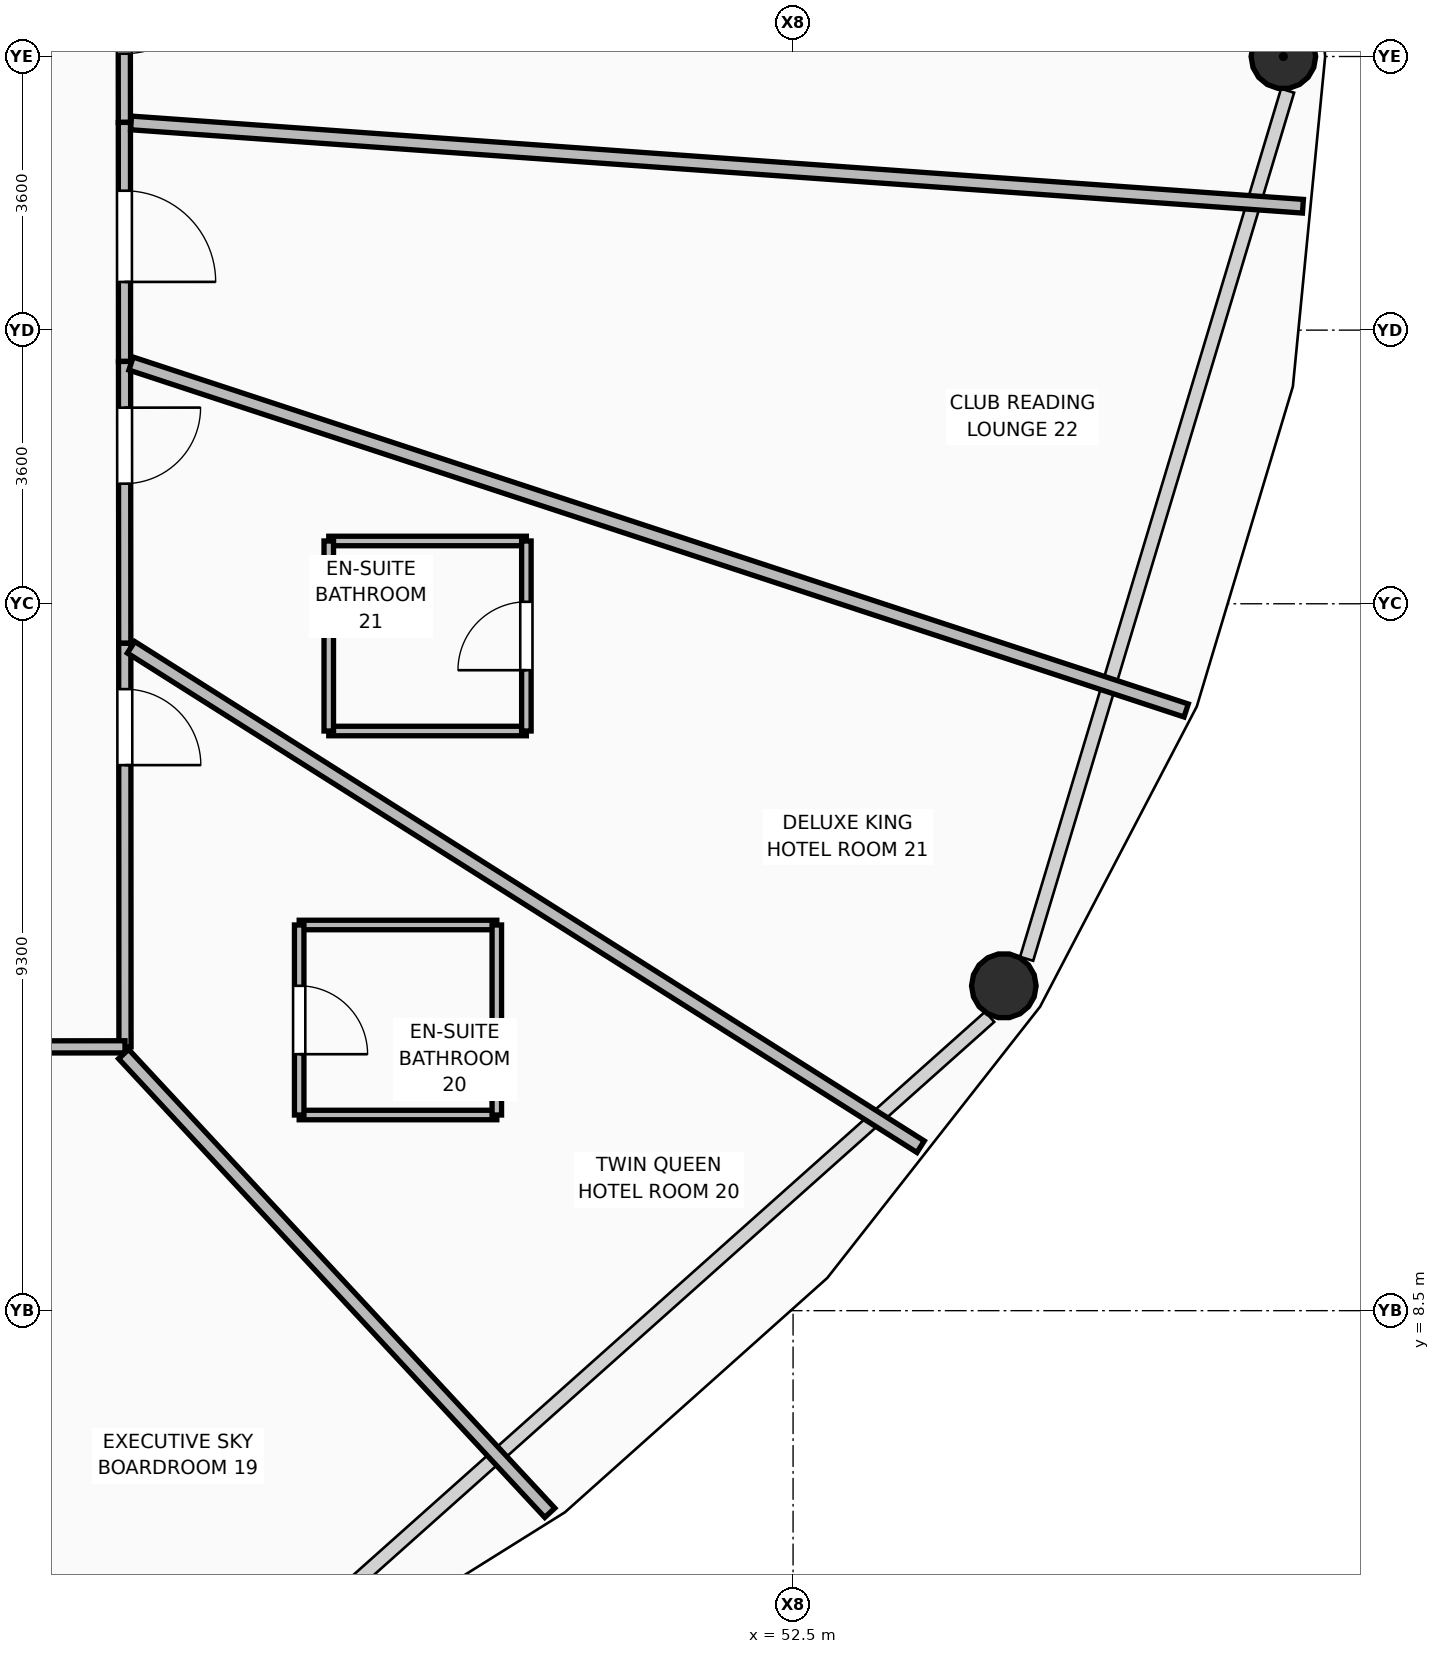
"""IFC4 building model, lengths in metres.
Left out: names, types, materials, properties, quantities, classifications, styles, units other than length and angle.
Written with IfcOpenShell. Run it as: python <this file> out.ifc"""

import sys

from ifc_helpers import new_model, si_unit, direction, frame, frame_2d, origin, origin_2d, place, context, subcontext, project, spatial, rectangle, hollow_circle, extrude, element, fill, save


model = new_model("IFC4")
c1 = context("Model", 3, precision=1e-05, world=origin(), true_north=direction((0.0, 1.0)))
c2 = subcontext(c1, "Body", "Model", "MODEL_VIEW")
j1 = project(units=[si_unit("LENGTHUNIT", "METRE"), si_unit("PLANEANGLEUNIT", "RADIAN")], contexts=[c1])
p1 = place(None, origin())
s1 = spatial("IfcSite", under=j1, at=p1, CompositionType="ELEMENT")
p2 = place(p1, origin())
s2 = spatial("IfcBuilding", under=s1, at=p2, CompositionType="ELEMENT")
p3 = place(p2, frame((0.0, 0.0, 64.5)))
s3 = spatial("IfcBuildingStorey", under=s2, at=p3, CompositionType="ELEMENT", Elevation=64.5)
p4 = place(p3, frame((58.951, 25.0, 0.0), z_axis=(0.055647755416, 0.0, 0.998450463126), x_axis=(0.0, 1.0, 0.0)))
e1 = element("IfcColumn", 1, at=p4, inside=s3, PredefinedType="COLUMN", context=c2, shape_type="SweptSolid", body=[
    extrude(hollow_circle(Radius=0.425, WallThickness=0.04, at=origin_2d()), origin(), (0.0, 0.0, 1.0), 3.576),
])
p5 = place(p3, frame((55.273, 12.774, 0.0), z_axis=(0.048413411524, -0.024855404506, 0.998518077178), x_axis=(0.456724176891, 0.889608355538, 0.0)))
e2 = element("IfcColumn", 2, at=p5, inside=s3, PredefinedType="COLUMN", context=c2, shape_type="SweptSolid", body=[
    extrude(hollow_circle(Radius=0.425, WallThickness=0.04, at=origin_2d()), origin(), (0.0, 0.0, 1.0), 3.575),
])
p6 = place(p3, frame((43.699, 27.142, 0.0), z_axis=(0.0, 0.0, 1.0), x_axis=(0.00097363037, -0.999999526022, 0.0)))
e3 = element("IfcWall", 3, at=p6, inside=s3, PredefinedType="PARTITIONING", context=c2, shape_type="SweptSolid", body=[
    extrude(rectangle(XDim=3.009, YDim=0.16, at=frame_2d((1.504, 0.0))), origin(), (0.0, 0.0, 1.0), 3.55),
])
p7 = place(p6, frame((0.905, 0.0, 0.0)))
e4 = element("IfcOpeningElement", 4, at=p7, cuts=e3, PredefinedType="OPENING", context=c2, shape_type="SweptSolid", body=[
    extrude(rectangle(XDim=1.2, YDim=2.1, at=frame_2d((0.6, 1.05))), frame((0.0, 0.09, 0.0), z_axis=(0.0, -1.0, 0.0), x_axis=(1.0, 0.0, 0.0)), (0.0, 0.0, 1.0), 0.18),
])
p8 = place(p3, frame((43.702, 24.133, 0.0), z_axis=(0.0, 0.0, 1.0), x_axis=(0.000698649108, -0.999999755945, 0.0)))
e5 = element("IfcWall", 5, at=p8, inside=s3, PredefinedType="PARTITIONING", context=c2, shape_type="SweptSolid", body=[
    extrude(rectangle(XDim=3.145, YDim=0.16, at=frame_2d((1.573, 0.0))), origin(), (0.0, 0.0, 1.0), 2.928),
])
p9 = place(p8, frame((0.899, 0.0, 0.0)))
e6 = element("IfcOpeningElement", 6, at=p9, cuts=e5, PredefinedType="OPENING", context=c2, shape_type="SweptSolid", body=[
    extrude(rectangle(XDim=1.2, YDim=2.1, at=frame_2d((0.6, 1.05))), frame((0.0, 0.09, 0.0), z_axis=(0.0, -1.0, 0.0), x_axis=(1.0, 0.0, 0.0)), (0.0, 0.0, 1.0), 0.18),
])
p10 = place(p3, frame((43.704, 20.988, 0.0), z_axis=(0.0, 0.0, 1.0), x_axis=(0.000790097199, -0.999999687873, 0.0)))
e7 = element("IfcWall", 7, at=p10, inside=s3, PredefinedType="PARTITIONING", context=c2, shape_type="SweptSolid", body=[
    extrude(rectangle(XDim=3.708, YDim=0.16, at=frame_2d((1.854, 0.0))), origin(), (0.0, 0.0, 1.0), 2.928),
])
p11 = place(p10, frame((0.608, 0.0, 0.0)))
e8 = element("IfcOpeningElement", 8, at=p11, cuts=e7, PredefinedType="OPENING", context=c2, shape_type="SweptSolid", body=[
    extrude(rectangle(XDim=1.0, YDim=2.1, at=frame_2d((0.5, 1.05))), frame((0.0, 0.09, 0.0), z_axis=(0.0, -1.0, 0.0), x_axis=(1.0, 0.0, 0.0)), (0.0, 0.0, 1.0), 0.18),
])
p12 = place(p3, frame((43.707, 17.28, 0.0), z_axis=(0.0, 0.0, 1.0), x_axis=(0.000551825539, -0.999999847744, 0.0)))
e9 = element("IfcWall", 9, at=p12, inside=s3, PredefinedType="PARTITIONING", context=c2, shape_type="SweptSolid", body=[
    extrude(rectangle(XDim=5.309, YDim=0.16, at=frame_2d((2.655, 0.0))), origin(), (0.0, 0.0, 1.0), 2.928),
])
p13 = place(p12, frame((0.603, 0.0, 0.0)))
e10 = element("IfcOpeningElement", 10, at=p13, cuts=e9, PredefinedType="OPENING", context=c2, shape_type="SweptSolid", body=[
    extrude(rectangle(XDim=1.0, YDim=2.1, at=frame_2d((0.5, 1.05))), frame((0.0, 0.09, 0.0), z_axis=(0.0, -1.0, 0.0), x_axis=(1.0, 0.0, 0.0)), (0.0, 0.0, 1.0), 0.18),
])
p14 = place(p3, frame((43.71, 11.971, 0.0), z_axis=(0.0, 0.0, 1.0), x_axis=(-0.999999746124, -0.000712567736, 0.0)))
e11 = element("IfcWall", 11, at=p14, inside=s3, PredefinedType="PARTITIONING", context=c2, shape_type="SweptSolid", body=[
    extrude(rectangle(XDim=5.482, YDim=0.16, at=frame_2d((2.741, 0.0))), origin(), (0.0, 0.0, 1.0), 2.928),
])
p15 = place(p14, frame((2.655, 0.0, 0.0)))
e12 = element("IfcOpeningElement", 12, at=p15, cuts=e11, PredefinedType="OPENING", context=c2, shape_type="SweptSolid", body=[
    extrude(rectangle(XDim=1.2, YDim=2.1, at=frame_2d((0.6, 1.05))), frame((0.0, 0.09, 0.0), z_axis=(0.0, -1.0, 0.0), x_axis=(1.0, 0.0, 0.0)), (0.0, 0.0, 1.0), 0.18),
])
p16 = place(p3, frame((38.276, 11.875, 0.0), z_axis=(0.0, 0.0, 1.0), x_axis=(0.458791558399, -0.888543924599, 0.0)))
e13 = element("IfcWall", 13, at=p16, inside=s3, PredefinedType="PARTITIONING", context=c2, shape_type="SweptSolid", body=[
    extrude(rectangle(XDim=10.585, YDim=0.18, at=frame_2d((5.292, 0.0))), origin(), (0.0, 0.0, 1.0), 2.775),
])
p17 = place(p3, frame((43.692, 11.876, 0.0), z_axis=(0.0, 0.0, 1.0), x_axis=(0.680668189446, -0.732591848082, 0.0)))
e14 = element("IfcWall", 14, at=p17, inside=s3, PredefinedType="PARTITIONING", context=c2, shape_type="SweptSolid", body=[
    extrude(rectangle(XDim=8.238, YDim=0.18, at=frame_2d((4.119, 0.0))), origin(), (0.0, 0.0, 1.0), 2.775),
])
p18 = place(p3, frame((43.79, 17.227, 0.0), z_axis=(0.0, 0.0, 1.0), x_axis=(0.845148426003, -0.534531699738, 0.0)))
e15 = element("IfcWall", 15, at=p18, inside=s3, PredefinedType="PARTITIONING", context=c2, shape_type="SweptSolid", body=[
    extrude(rectangle(XDim=12.291, YDim=0.18, at=frame_2d((6.146, 0.0))), origin(), (0.0, 0.0, 1.0), 2.775),
])
p19 = place(p3, frame((43.79, 20.96, 0.0), z_axis=(0.0, 0.0, 1.0), x_axis=(0.949976738753, -0.312320661864, 0.0)))
e16 = element("IfcWall", 16, at=p19, inside=s3, PredefinedType="PARTITIONING", context=c2, shape_type="SweptSolid", body=[
    extrude(rectangle(XDim=14.613, YDim=0.18, at=frame_2d((7.307, 0.0))), origin(), (0.0, 0.0, 1.0), 2.775),
])
p20 = place(p3, frame((43.79, 24.126, 0.0), z_axis=(0.0, 0.0, 1.0), x_axis=(0.997483174991, -0.070903565565, 0.0)))
e17 = element("IfcWall", 17, at=p20, inside=s3, PredefinedType="PARTITIONING", context=c2, shape_type="SweptSolid", body=[
    extrude(rectangle(XDim=15.457, YDim=0.18, at=frame_2d((7.729, 0.0))), origin(), (0.0, 0.0, 1.0), 2.775),
])
for number, where, z_axis, x_axis in (
    (18, (46.002, 11.074, 0.0), (0.0, 0.0, 1.0), (1.0, 0.0, 0.0)),
    (19, (46.002, 13.574, 0.0), (0.0, 0.0, 1.0), (1.0, 0.0, 0.0)),
):
    element("IfcWall", number, at=place(p3, frame(where, z_axis=z_axis, x_axis=x_axis)), inside=s3, PredefinedType="PARTITIONING", context=c2, shape_type="SweptSolid", body=[
        extrude(rectangle(XDim=2.6, YDim=0.125, at=frame_2d((1.3, 0.0))), origin(), (0.0, 0.0, 1.0), 3.55),
    ])
p21 = place(p3, frame((46.002, 11.074, 0.0), z_axis=(0.0, 0.0, 1.0), x_axis=(0.0, 1.0, 0.0)))
e20 = element("IfcWall", 20, at=p21, inside=s3, PredefinedType="PARTITIONING", context=c2, shape_type="SweptSolid", body=[
    extrude(rectangle(XDim=2.5, YDim=0.125, at=frame_2d((1.25, 0.0))), origin(), (0.0, 0.0, 1.0), 3.55),
])
p22 = place(p21, frame((0.8, 0.0, 0.0)))
e21 = element("IfcOpeningElement", 21, at=p22, cuts=e20, PredefinedType="OPENING", context=c2, shape_type="SweptSolid", body=[
    extrude(rectangle(XDim=0.9, YDim=2.1, at=frame_2d((0.45, 1.05))), frame((0.0, 0.073, 0.0), z_axis=(0.0, -1.0, 0.0), x_axis=(1.0, 0.0, 0.0)), (0.0, 0.0, 1.0), 0.145),
])
p23 = place(p3, frame((48.602, 11.074, 0.0), z_axis=(0.0, 0.0, 1.0), x_axis=(0.0, 1.0, 0.0)))
e22 = element("IfcWall", 22, at=p23, inside=s3, PredefinedType="PARTITIONING", context=c2, shape_type="SweptSolid", body=[
    extrude(rectangle(XDim=2.5, YDim=0.125, at=frame_2d((1.25, 0.0))), origin(), (0.0, 0.0, 1.0), 3.55),
])
p24 = place(p3, frame((46.391, 16.126, 0.0), z_axis=(0.0, 0.0, 1.0), x_axis=(1.0, 0.0, 0.0)))
e23 = element("IfcWall", 23, at=p24, inside=s3, PredefinedType="PARTITIONING", context=c2, shape_type="SweptSolid", body=[
    extrude(rectangle(XDim=2.6, YDim=0.125, at=frame_2d((1.3, 0.0))), origin(), (0.0, 0.0, 1.0), 2.928),
])
p25 = place(p3, frame((46.391, 18.626, 0.0), z_axis=(0.0, 0.0, 1.0), x_axis=(1.0, 0.0, 0.0)))
e24 = element("IfcWall", 24, at=p25, inside=s3, PredefinedType="PARTITIONING", context=c2, shape_type="SweptSolid", body=[
    extrude(rectangle(XDim=2.6, YDim=0.125, at=frame_2d((1.3, 0.0))), origin(), (0.0, 0.0, 1.0), 3.55),
])
p26 = place(p3, frame((46.391, 16.126, 0.0), z_axis=(0.0, 0.0, 1.0), x_axis=(0.0, 1.0, 0.0)))
e25 = element("IfcWall", 25, at=p26, inside=s3, PredefinedType="PARTITIONING", context=c2, shape_type="SweptSolid", body=[
    extrude(rectangle(XDim=2.5, YDim=0.125, at=frame_2d((1.25, 0.0))), origin(), (0.0, 0.0, 1.0), 2.928),
])
p27 = place(p3, frame((48.991, 16.126, 0.0), z_axis=(0.0, 0.0, 1.0), x_axis=(0.0, 1.0, 0.0)))
e26 = element("IfcWall", 26, at=p27, inside=s3, PredefinedType="PARTITIONING", context=c2, shape_type="SweptSolid", body=[
    extrude(rectangle(XDim=2.5, YDim=0.125, at=frame_2d((1.25, 0.0))), origin(), (0.0, 0.0, 1.0), 3.55),
])
p28 = place(p27, frame((0.8, 0.0, 0.0)))
e27 = element("IfcOpeningElement", 27, at=p28, cuts=e26, PredefinedType="OPENING", context=c2, shape_type="SweptSolid", body=[
    extrude(rectangle(XDim=0.9, YDim=2.1, at=frame_2d((0.45, 1.05))), frame((0.0, 0.073, 0.0), z_axis=(0.0, -1.0, 0.0), x_axis=(1.0, 0.0, 0.0)), (0.0, 0.0, 1.0), 0.145),
])
p29 = place(p22, frame((0.9, 0.0, 0.0), z_axis=(0.0, 0.0, 1.0), x_axis=(-1.0, 0.0, 0.0)))
e28 = element("IfcDoor", 28, at=p29, inside=s3, OperationType="SINGLE_SWING_RIGHT", PredefinedType="DOOR", context=c2, shape_type="SweptSolid", body=[
    extrude(rectangle(XDim=0.9, YDim=2.1, at=frame_2d((0.45, 1.05))), frame((0.0, 0.025, 0.0), z_axis=(0.0, -1.0, 0.0), x_axis=(1.0, 0.0, 0.0)), (0.0, 0.0, 1.0), 0.05),
])
fill(e21, e28)
p30 = place(p13, origin())
e29 = element("IfcDoor", 29, at=p30, inside=s3, OperationType="SINGLE_SWING_RIGHT", PredefinedType="DOOR", context=c2, shape_type="SweptSolid", body=[
    extrude(rectangle(XDim=1.0, YDim=2.1, at=frame_2d((0.5, 1.05))), frame((0.0, 0.025, 0.0), z_axis=(0.0, -1.0, 0.0), x_axis=(1.0, 0.0, 0.0)), (0.0, 0.0, 1.0), 0.05),
])
fill(e10, e29)
p31 = place(p28, origin())
e30 = element("IfcDoor", 30, at=p31, inside=s3, OperationType="SINGLE_SWING_LEFT", PredefinedType="DOOR", context=c2, shape_type="SweptSolid", body=[
    extrude(rectangle(XDim=0.9, YDim=2.1, at=frame_2d((0.45, 1.05))), frame((0.0, 0.025, 0.0), z_axis=(0.0, -1.0, 0.0), x_axis=(1.0, 0.0, 0.0)), (0.0, 0.0, 1.0), 0.05),
])
fill(e27, e30)
p32 = place(p11, origin())
e31 = element("IfcDoor", 31, at=p32, inside=s3, OperationType="SINGLE_SWING_LEFT", PredefinedType="DOOR", context=c2, shape_type="SweptSolid", body=[
    extrude(rectangle(XDim=1.0, YDim=2.1, at=frame_2d((0.5, 1.05))), frame((0.0, 0.025, 0.0), z_axis=(0.0, -1.0, 0.0), x_axis=(1.0, 0.0, 0.0)), (0.0, 0.0, 1.0), 0.05),
])
fill(e8, e31)
p33 = place(p9, origin())
e32 = element("IfcDoor", 32, at=p33, inside=s3, OperationType="SINGLE_SWING_RIGHT", PredefinedType="DOOR", context=c2, shape_type="SweptSolid", body=[
    extrude(rectangle(XDim=1.2, YDim=2.1, at=frame_2d((0.6, 1.05))), frame((0.0, 0.025, 0.0), z_axis=(0.0, -1.0, 0.0), x_axis=(1.0, 0.0, 0.0)), (0.0, 0.0, 1.0), 0.05),
])
fill(e6, e32)
p34 = place(p7, origin())
e33 = element("IfcDoor", 33, at=p34, inside=s3, OperationType="SINGLE_SWING_LEFT", PredefinedType="DOOR", context=c2, shape_type="SweptSolid", body=[
    extrude(rectangle(XDim=1.2, YDim=2.1, at=frame_2d((0.6, 1.05))), frame((0.0, 0.025, 0.0), z_axis=(0.0, -1.0, 0.0), x_axis=(1.0, 0.0, 0.0)), (0.0, 0.0, 1.0), 0.05),
])
fill(e4, e33)
save(model, sys.argv[1])
